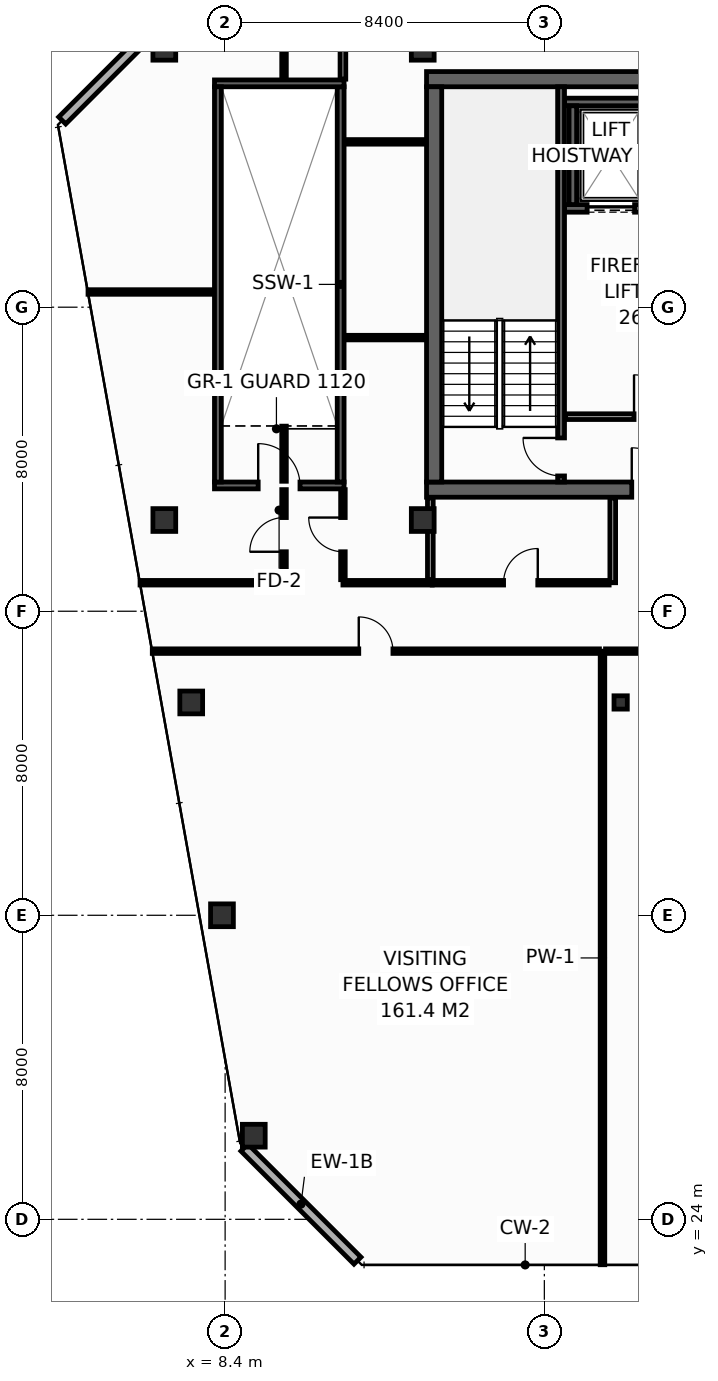
"""IFC4 building model, lengths in metres.
Left out: names, types, materials, properties, quantities, classifications, styles, units other than length and angle.
Written with IfcOpenShell. Run it as: python <this file> out.ifc"""

import sys

from ifc_helpers import new_model, si_unit, direction, frame, frame_2d, origin, origin_2d, place, context, subcontext, project, spatial, rectangle, hollow_rectangle, extrude, element, fill, save


model = new_model("IFC4")
c1 = context("Model", 3, precision=1e-05, world=origin(), true_north=direction((0.0, 1.0)))
c2 = subcontext(c1, "Body", "Model", "MODEL_VIEW")
j1 = project(units=[si_unit("LENGTHUNIT", "METRE"), si_unit("PLANEANGLEUNIT", "RADIAN")], contexts=[c1])
p1 = place(None, origin())
s1 = spatial("IfcSite", under=j1, at=p1, CompositionType="ELEMENT")
p2 = place(p1, origin())
s2 = spatial("IfcBuilding", under=s1, at=p2, CompositionType="ELEMENT")
p3 = place(p2, frame((0.0, 0.0, 272.4)))
s3 = spatial("IfcBuildingStorey", under=s2, at=p3, CompositionType="ELEMENT", Elevation=272.4)
p4 = place(p3, frame((13.7, 43.2, 0.0), z_axis=(0.0, 0.0, 1.0), x_axis=(1.0, 0.0, 0.0)))
e1 = element("IfcWall", 1, at=p4, inside=s3, PredefinedType="SHEAR", context=c2, shape_type="SweptSolid", body=[
    extrude(rectangle(XDim=32.5, YDim=0.4, at=frame_2d((16.25, 0.0))), origin(), (0.0, 0.0, 1.0), 3.35),
])
p5 = place(p4, frame((5.4, 0.0, 0.0)))
e2 = element("IfcOpeningElement", 2, at=p5, cuts=e1, PredefinedType="OPENING", context=c2, shape_type="SweptSolid", body=[
    extrude(rectangle(XDim=1.1, YDim=2.15, at=frame_2d((0.55, 1.075))), frame((0.0, 0.21, 0.0), z_axis=(0.0, -1.0, 0.0), x_axis=(1.0, 0.0, 0.0)), (0.0, 0.0, 1.0), 0.42),
])
p6 = place(p4, frame((25.6, 0.0, 0.0)))
e3 = element("IfcOpeningElement", 3, at=p6, cuts=e1, PredefinedType="OPENING", context=c2, shape_type="SweptSolid", body=[
    extrude(rectangle(XDim=1.1, YDim=2.15, at=frame_2d((0.55, 1.075))), frame((0.0, 0.21, 0.0), z_axis=(0.0, -1.0, 0.0), x_axis=(1.0, 0.0, 0.0)), (0.0, 0.0, 1.0), 0.42),
])
p7 = place(p3, frame((13.7, 54.0, 0.0), z_axis=(0.0, 0.0, 1.0), x_axis=(1.0, 0.0, 0.0)))
e4 = element("IfcWall", 4, at=p7, inside=s3, PredefinedType="SHEAR", context=c2, shape_type="SweptSolid", body=[
    extrude(rectangle(XDim=32.5, YDim=0.4, at=frame_2d((16.25, 0.0))), origin(), (0.0, 0.0, 1.0), 3.35),
])
p8 = place(p3, frame((13.9, 43.4, 0.0), z_axis=(0.0, 0.0, 1.0), x_axis=(0.0, 1.0, 0.0)))
e5 = element("IfcWall", 5, at=p8, inside=s3, PredefinedType="SHEAR", context=c2, shape_type="SweptSolid", body=[
    extrude(rectangle(XDim=10.4, YDim=0.4, at=frame_2d((5.2, 0.0))), origin(), (0.0, 0.0, 1.0), 3.35),
])
for number, where, z_axis, x_axis in (
    (6, (6.8, 54.8, 0.0), (0.0, 0.0, 1.0), (1.0, 0.0, 0.0)),
    (7, (13.6, 54.8, 0.0), (0.0, 0.0, 1.0), (1.0, 0.0, 0.0)),
    (8, (6.8, 42.4, 0.0), (0.0, 0.0, 1.0), (1.0, 0.0, 0.0)),
    (9, (13.6, 42.4, 0.0), (0.0, 0.0, 1.0), (1.0, 0.0, 0.0)),
    (10, (9.154, 26.2, 0.0), (0.0, 0.0, 1.0), (1.0, 0.0, 0.0)),
    (11, (8.317, 32.0, 0.0), (0.0, 0.0, 1.0), (1.0, 0.0, 0.0)),
    (12, (7.508, 37.6, 0.0), (0.0, 0.0, 1.0), (1.0, 0.0, 0.0)),
):
    element("IfcColumn", number, at=place(p3, frame(where, z_axis=z_axis, x_axis=x_axis)), inside=s3, PredefinedType="COLUMN", context=c2, shape_type="SweptSolid", body=[
        extrude(hollow_rectangle(XDim=0.6, YDim=0.6, WallThickness=0.028, at=origin_2d()), origin(), (0.0, 0.0, 1.0), 3.8),
    ])
p9 = place(p3, frame((18.808, 37.6, 0.0), z_axis=(0.0, 0.0, 1.0), x_axis=(1.0, 0.0, 0.0)))
e13 = element("IfcColumn", 13, at=p9, inside=s3, PredefinedType="COLUMN", context=c2, shape_type="SweptSolid", body=[
    extrude(hollow_rectangle(XDim=0.35, YDim=0.35, WallThickness=0.016, at=origin_2d()), origin(), (0.0, 0.0, 1.0), 3.8),
])
p10 = place(p3, frame((17.33, 50.6, 0.0), z_axis=(0.0, 0.0, 1.0), x_axis=(1.0, 0.0, 0.0)))
e14 = element("IfcWall", 14, at=p10, inside=s3, PredefinedType="SHEAR", context=c2, shape_type="SweptSolid", body=[
    extrude(rectangle(XDim=2.52, YDim=0.2, at=frame_2d((1.26, 0.0))), origin(), (0.0, 0.0, 1.0), 3.35),
])
p11 = place(p10, frame((0.595, 0.0, 0.0)))
e15 = element("IfcOpeningElement", 15, at=p11, cuts=e14, PredefinedType="OPENING", context=c2, shape_type="SweptSolid", body=[
    extrude(rectangle(XDim=1.25, YDim=2.3, at=frame_2d((0.625, 1.15))), frame((0.0, 0.11, 0.0), z_axis=(0.0, -1.0, 0.0), x_axis=(1.0, 0.0, 0.0)), (0.0, 0.0, 1.0), 0.22),
])
p12 = place(p3, frame((17.33, 53.4, 0.0), z_axis=(0.0, 0.0, 1.0), x_axis=(1.0, 0.0, 0.0)))
e16 = element("IfcWall", 16, at=p12, inside=s3, PredefinedType="SHEAR", context=c2, shape_type="SweptSolid", body=[
    extrude(rectangle(XDim=2.52, YDim=0.2, at=frame_2d((1.26, 0.0))), origin(), (0.0, 0.0, 1.0), 3.35),
])
p13 = place(p3, frame((17.55, 50.7, 0.0), z_axis=(0.0, 0.0, 1.0), x_axis=(0.0, 1.0, 0.0)))
e17 = element("IfcWall", 17, at=p13, inside=s3, PredefinedType="SHEAR", context=c2, shape_type="SweptSolid", body=[
    extrude(rectangle(XDim=2.6, YDim=0.2, at=frame_2d((1.3, 0.0))), origin(), (0.0, 0.0, 1.0), 3.35),
])
p14 = place(p3, frame((17.24, 43.4, 0.0), z_axis=(0.0, 0.0, 1.0), x_axis=(0.0, 1.0, 0.0)))
e18 = element("IfcWall", 18, at=p14, inside=s3, PredefinedType="SHEAR", context=c2, shape_type="SweptSolid", body=[
    extrude(rectangle(XDim=10.4, YDim=0.18, at=frame_2d((5.2, 0.0))), origin(), (0.0, 0.0, 1.0), 3.35),
])
p15 = place(p14, frame((0.16, 0.0, 0.0)))
e19 = element("IfcOpeningElement", 19, at=p15, cuts=e18, PredefinedType="OPENING", context=c2, shape_type="SweptSolid", body=[
    extrude(rectangle(XDim=1.0, YDim=2.15, at=frame_2d((0.5, 1.075))), frame((0.0, 0.1, 0.0), z_axis=(0.0, -1.0, 0.0), x_axis=(1.0, 0.0, 0.0)), (0.0, 0.0, 1.0), 0.2),
])
p16 = place(p3, frame((8.12, 43.31, 0.0), z_axis=(0.0, 0.0, 1.0), x_axis=(1.0, 0.0, 0.0)))
e20 = element("IfcWall", 20, at=p16, inside=s3, PredefinedType="SHEAR", context=c2, shape_type="SweptSolid", body=[
    extrude(rectangle(XDim=3.41, YDim=0.18, at=frame_2d((1.705, 0.0))), origin(), (0.0, 0.0, 1.0), 3.35),
])
p17 = place(p16, frame((1.15, 0.0, 0.0)))
e21 = element("IfcOpeningElement", 21, at=p17, cuts=e20, PredefinedType="OPENING", context=c2, shape_type="SweptSolid", body=[
    extrude(rectangle(XDim=1.1, YDim=2.15, at=frame_2d((0.55, 1.075))), frame((0.0, 0.1, 0.0), z_axis=(0.0, -1.0, 0.0), x_axis=(1.0, 0.0, 0.0)), (0.0, 0.0, 1.0), 0.2),
])
p18 = place(p3, frame((11.44, 43.4, 0.0), z_axis=(0.0, 0.0, 1.0), x_axis=(0.0, 1.0, 0.0)))
e22 = element("IfcWall", 22, at=p18, inside=s3, PredefinedType="SHEAR", context=c2, shape_type="SweptSolid", body=[
    extrude(rectangle(XDim=10.4, YDim=0.18, at=frame_2d((5.2, 0.0))), origin(), (0.0, 0.0, 1.0), 3.35),
])
p19 = place(p3, frame((11.53, 53.89, 0.0), z_axis=(0.0, 0.0, 1.0), x_axis=(-1.0, 0.0, 0.0)))
e23 = element("IfcWall", 23, at=p19, inside=s3, PredefinedType="SHEAR", context=c2, shape_type="SweptSolid", body=[
    extrude(rectangle(XDim=3.41, YDim=0.18, at=frame_2d((1.705, 0.0))), origin(), (0.0, 0.0, 1.0), 3.35),
])
p20 = place(p3, frame((8.21, 53.8, 0.0), z_axis=(0.0, 0.0, 1.0), x_axis=(0.0, -1.0, 0.0)))
e24 = element("IfcWall", 24, at=p20, inside=s3, PredefinedType="SHEAR", context=c2, shape_type="SweptSolid", body=[
    extrude(rectangle(XDim=10.4, YDim=0.18, at=frame_2d((5.2, 0.0))), origin(), (0.0, 0.0, 1.0), 3.35),
])
p21 = place(p3, frame((17.36, 45.12, 0.0), z_axis=(0.0, 0.0, 1.0), x_axis=(1.0, 0.0, 0.0)))
e25 = element("IfcWall", 25, at=p21, inside=s3, PredefinedType="PARTITIONING", context=c2, shape_type="SweptSolid", body=[
    extrude(rectangle(XDim=5.14, YDim=0.15, at=frame_2d((2.57, 0.0))), origin(), (0.0, 0.0, 1.0), 3.35),
])
p22 = place(p21, frame((1.8, 0.0, 0.0)))
e26 = element("IfcOpeningElement", 26, at=p22, cuts=e25, PredefinedType="OPENING", context=c2, shape_type="SweptSolid", body=[
    extrude(rectangle(XDim=1.1, YDim=2.15, at=frame_2d((0.55, 1.075))), frame((0.0, 0.085, 0.0), z_axis=(0.0, -1.0, 0.0), x_axis=(1.0, 0.0, 0.0)), (0.0, 0.0, 1.0), 0.17),
])
for number, where, z_axis, x_axis in (
    (27, (8.909, 25.887, 0.0), (0.0, 0.0, 1.0), (0.707, -0.707, 0.0)),
    (28, (7.087, 55.887, 0.0), (0.0, 0.0, 1.0), (-0.707, -0.707, 0.0)),
):
    element("IfcWall", number, at=place(p3, frame(where, z_axis=z_axis, x_axis=x_axis)), inside=s3, PredefinedType="STANDARD", context=c2, shape_type="SweptSolid", body=[
        extrude(rectangle(XDim=4.206, YDim=0.26, at=frame_2d((2.103, 0.0))), origin(), (0.0, 0.0, 1.0), 3.35),
    ])
p23 = place(p3, frame((6.161, 40.75, 0.0), z_axis=(0.0, 0.0, 1.0), x_axis=(1.0, 0.0, 0.0)))
e29 = element("IfcWall", 29, at=p23, inside=s3, PredefinedType="PARTITIONING", context=c2, shape_type="SweptSolid", body=[
    extrude(rectangle(XDim=3.789, YDim=0.12, at=frame_2d((1.894, 0.0))), origin(), (0.0, 0.0, 1.0), 2.885),
])
p24 = place(p3, frame((11.5, 40.75, 0.0), z_axis=(0.0, 0.0, 1.0), x_axis=(1.0, 0.0, 0.0)))
e30 = element("IfcWall", 30, at=p24, inside=s3, PredefinedType="PARTITIONING", context=c2, shape_type="SweptSolid", body=[
    extrude(rectangle(XDim=2.35, YDim=0.12, at=frame_2d((1.175, 0.0))), origin(), (0.0, 0.0, 1.0), 3.35),
])
p25 = place(p3, frame((11.55, 52.35, 0.0), z_axis=(0.0, 0.0, 1.0), x_axis=(1.0, 0.0, 0.0)))
e31 = element("IfcWall", 31, at=p25, inside=s3, PredefinedType="PARTITIONING", context=c2, shape_type="SweptSolid", body=[
    extrude(rectangle(XDim=2.13, YDim=0.12, at=frame_2d((1.065, 0.0))), origin(), (0.0, 0.0, 1.0), 3.35),
])
p26 = place(p3, frame((11.5, 54.0, 0.0), z_axis=(0.0, 0.0, 1.0), x_axis=(0.0, 1.0, 0.0)))
e32 = element("IfcWall", 32, at=p26, inside=s3, PredefinedType="PARTITIONING", context=c2, shape_type="SweptSolid", body=[
    extrude(rectangle(XDim=1.995, YDim=0.15, at=frame_2d((0.998, 0.0))), origin(), (0.0, 0.0, 1.0), 2.735),
])
p27 = place(p3, frame((4.792, 48.4, 0.0), z_axis=(0.0, 0.0, 1.0), x_axis=(1.0, 0.0, 0.0)))
e33 = element("IfcWall", 33, at=p27, inside=s3, PredefinedType="PARTITIONING", context=c2, shape_type="SweptSolid", body=[
    extrude(rectangle(XDim=3.308, YDim=0.12, at=frame_2d((1.654, 0.0))), origin(), (0.0, 0.0, 1.0), 2.747),
])
p28 = place(p3, frame((9.95, 40.83, 0.0), z_axis=(0.0, 0.0, 1.0), x_axis=(0.0, 1.0, 0.0)))
e34 = element("IfcWall", 34, at=p28, inside=s3, PredefinedType="PARTITIONING", context=c2, shape_type="SweptSolid", body=[
    extrude(rectangle(XDim=2.37, YDim=0.12, at=frame_2d((1.185, 0.0))), origin(), (0.0, 0.0, 1.0), 2.747),
])
p29 = place(p28, frame((0.735, 0.0, 0.0)))
e35 = element("IfcOpeningElement", 35, at=p29, cuts=e34, PredefinedType="OPENING", context=c2, shape_type="SweptSolid", body=[
    extrude(rectangle(XDim=0.9, YDim=2.1, at=frame_2d((0.45, 1.05))), frame((0.0, 0.07, 0.0), z_axis=(0.0, -1.0, 0.0), x_axis=(1.0, 0.0, 0.0)), (0.0, 0.0, 1.0), 0.14),
])
p30 = place(p3, frame((9.95, 43.42, 0.0), z_axis=(0.0, 0.0, 1.0), x_axis=(0.0, 1.0, 0.0)))
e36 = element("IfcWall", 36, at=p30, inside=s3, PredefinedType="PARTITIONING", context=c2, shape_type="SweptSolid", body=[
    extrude(rectangle(XDim=1.45, YDim=0.12, at=frame_2d((0.725, 0.0))), origin(), (0.0, 0.0, 1.0), 3.35),
])
p31 = place(p3, frame((9.95, 54.0, 0.0), z_axis=(0.0, 0.0, 1.0), x_axis=(0.0, 1.0, 0.0)))
e37 = element("IfcWall", 37, at=p31, inside=s3, PredefinedType="PARTITIONING", context=c2, shape_type="SweptSolid", body=[
    extrude(rectangle(XDim=1.995, YDim=0.12, at=frame_2d((0.998, 0.0))), origin(), (0.0, 0.0, 1.0), 2.735),
])
p32 = place(p3, frame((11.55, 47.2, 0.0), z_axis=(0.0, 0.0, 1.0), x_axis=(1.0, 0.0, 0.0)))
e38 = element("IfcWall", 38, at=p32, inside=s3, PredefinedType="PARTITIONING", context=c2, shape_type="SweptSolid", body=[
    extrude(rectangle(XDim=2.13, YDim=0.12, at=frame_2d((1.065, 0.0))), origin(), (0.0, 0.0, 1.0), 3.35),
])
p33 = place(p3, frame((11.5, 40.83, 0.0), z_axis=(0.0, 0.0, 1.0), x_axis=(0.0, 1.0, 0.0)))
e39 = element("IfcWall", 39, at=p33, inside=s3, PredefinedType="PARTITIONING", context=c2, shape_type="SweptSolid", body=[
    extrude(rectangle(XDim=2.37, YDim=0.12, at=frame_2d((1.185, 0.0))), origin(), (0.0, 0.0, 1.0), 2.747),
])
p34 = place(p33, frame((0.735, 0.0, 0.0)))
e40 = element("IfcOpeningElement", 40, at=p34, cuts=e39, PredefinedType="OPENING", context=c2, shape_type="SweptSolid", body=[
    extrude(rectangle(XDim=0.9, YDim=2.1, at=frame_2d((0.45, 1.05))), frame((0.0, 0.07, 0.0), z_axis=(0.0, -1.0, 0.0), x_axis=(1.0, 0.0, 0.0)), (0.0, 0.0, 1.0), 0.14),
])
p35 = place(p3, frame((13.8, 40.83, 0.0), z_axis=(0.0, 0.0, 1.0), x_axis=(0.0, 1.0, 0.0)))
e41 = element("IfcWall", 41, at=p35, inside=s3, PredefinedType="PARTITIONING", context=c2, shape_type="SweptSolid", body=[
    extrude(rectangle(XDim=2.15, YDim=0.15, at=frame_2d((1.075, 0.0))), origin(), (0.0, 0.0, 1.0), 3.35),
])
p36 = place(p3, frame((18.6, 40.75, 0.0), z_axis=(0.0, 0.0, 1.0), x_axis=(0.0, 1.0, 0.0)))
e42 = element("IfcWall", 42, at=p36, inside=s3, PredefinedType="PARTITIONING", context=c2, shape_type="SweptSolid", body=[
    extrude(rectangle(XDim=2.23, YDim=0.15, at=frame_2d((1.115, 0.0))), origin(), (0.0, 0.0, 1.0), 3.35),
])
p37 = place(p3, frame((13.85, 40.75, 0.0), z_axis=(0.0, 0.0, 1.0), x_axis=(1.0, 0.0, 0.0)))
e43 = element("IfcWall", 43, at=p37, inside=s3, PredefinedType="PARTITIONING", context=c2, shape_type="SweptSolid", body=[
    extrude(rectangle(XDim=4.655, YDim=0.12, at=frame_2d((2.327, 0.0))), origin(), (0.0, 0.0, 1.0), 3.35),
])
p38 = place(p37, frame((1.877, 0.0, 0.0)))
e44 = element("IfcOpeningElement", 44, at=p38, cuts=e43, PredefinedType="OPENING", context=c2, shape_type="SweptSolid", body=[
    extrude(rectangle(XDim=0.9, YDim=2.1, at=frame_2d((0.45, 1.05))), frame((0.0, 0.07, 0.0), z_axis=(0.0, -1.0, 0.0), x_axis=(1.0, 0.0, 0.0)), (0.0, 0.0, 1.0), 0.14),
])
p39 = place(p3, frame((18.33, 22.805, 0.0), z_axis=(0.0, 0.0, 1.0), x_axis=(0.0, 1.0, 0.0)))
e45 = element("IfcWall", 45, at=p39, inside=s3, PredefinedType="PARTITIONING", context=c2, shape_type="SweptSolid", body=[
    extrude(rectangle(XDim=16.145, YDim=0.12, at=frame_2d((8.073, 0.0))), origin(), (0.0, 0.0, 1.0), 1.535),
])
p40 = place(p3, frame((6.483, 38.95, 0.0), z_axis=(0.0, 0.0, 1.0), x_axis=(1.0, 0.0, 0.0)))
e46 = element("IfcWall", 46, at=p40, inside=s3, PredefinedType="PARTITIONING", context=c2, shape_type="SweptSolid", body=[
    extrude(rectangle(XDim=11.767, YDim=0.12, at=frame_2d((5.883, 0.0))), origin(), (0.0, 0.0, 1.0), 2.885),
])
p41 = place(p40, frame((5.433, 0.0, 0.0)))
e47 = element("IfcOpeningElement", 47, at=p41, cuts=e46, PredefinedType="OPENING", context=c2, shape_type="SweptSolid", body=[
    extrude(rectangle(XDim=0.9, YDim=2.1, at=frame_2d((0.45, 1.05))), frame((0.0, 0.07, 0.0), z_axis=(0.0, -1.0, 0.0), x_axis=(1.0, 0.0, 0.0)), (0.0, 0.0, 1.0), 0.14),
])
p42 = place(p3, frame((18.41, 38.95, 0.0), z_axis=(0.0, 0.0, 1.0), x_axis=(1.0, 0.0, 0.0)))
e48 = element("IfcWall", 48, at=p42, inside=s3, PredefinedType="PARTITIONING", context=c2, shape_type="SweptSolid", body=[
    extrude(rectangle(XDim=1.315, YDim=0.12, at=frame_2d((0.657, 0.0))), origin(), (0.0, 0.0, 1.0), 3.35),
])
p43 = place(p11, origin())
e49 = element("IfcDoor", 49, at=p43, inside=s3, OperationType="SLIDING_TO_LEFT", PredefinedType="DOOR", context=c2, shape_type="SweptSolid", body=[
    extrude(rectangle(XDim=1.25, YDim=2.3, at=frame_2d((0.625, 1.15))), frame((0.0, 0.025, 0.0), z_axis=(0.0, -1.0, 0.0), x_axis=(1.0, 0.0, 0.0)), (0.0, 0.0, 1.0), 0.05),
])
fill(e15, e49)
p44 = place(p15, origin())
e50 = element("IfcDoor", 50, at=p44, inside=s3, OperationType="SINGLE_SWING_RIGHT", PredefinedType="DOOR", context=c2, shape_type="SweptSolid", body=[
    extrude(rectangle(XDim=1.0, YDim=2.15, at=frame_2d((0.5, 1.075))), frame((0.0, 0.025, 0.0), z_axis=(0.0, -1.0, 0.0), x_axis=(1.0, 0.0, 0.0)), (0.0, 0.0, 1.0), 0.05),
])
fill(e19, e50)
p45 = place(p17, origin())
e51 = element("IfcDoor", 51, at=p45, inside=s3, OperationType="SINGLE_SWING_LEFT", PredefinedType="DOOR", context=c2, shape_type="SweptSolid", body=[
    extrude(rectangle(XDim=1.1, YDim=2.15, at=frame_2d((0.55, 1.075))), frame((0.0, 0.025, 0.0), z_axis=(0.0, -1.0, 0.0), x_axis=(1.0, 0.0, 0.0)), (0.0, 0.0, 1.0), 0.05),
])
fill(e21, e51)
p46 = place(p22, origin())
e52 = element("IfcDoor", 52, at=p46, inside=s3, OperationType="SINGLE_SWING_LEFT", PredefinedType="DOOR", context=c2, shape_type="SweptSolid", body=[
    extrude(rectangle(XDim=1.1, YDim=2.15, at=frame_2d((0.55, 1.075))), frame((0.0, 0.025, 0.0), z_axis=(0.0, -1.0, 0.0), x_axis=(1.0, 0.0, 0.0)), (0.0, 0.0, 1.0), 0.05),
])
fill(e26, e52)
p47 = place(p5, origin())
e53 = element("IfcDoor", 53, at=p47, inside=s3, OperationType="SINGLE_SWING_LEFT", PredefinedType="DOOR", context=c2, shape_type="SweptSolid", body=[
    extrude(rectangle(XDim=1.1, YDim=2.15, at=frame_2d((0.55, 1.075))), frame((0.0, 0.025, 0.0), z_axis=(0.0, -1.0, 0.0), x_axis=(1.0, 0.0, 0.0)), (0.0, 0.0, 1.0), 0.05),
])
fill(e2, e53)
p48 = place(p29, origin())
e54 = element("IfcDoor", 54, at=p48, inside=s3, OperationType="SINGLE_SWING_LEFT", PredefinedType="DOOR", context=c2, shape_type="SweptSolid", body=[
    extrude(rectangle(XDim=0.9, YDim=2.1, at=frame_2d((0.45, 1.05))), frame((0.0, 0.025, 0.0), z_axis=(0.0, -1.0, 0.0), x_axis=(1.0, 0.0, 0.0)), (0.0, 0.0, 1.0), 0.05),
])
fill(e35, e54)
p49 = place(p34, origin())
e55 = element("IfcDoor", 55, at=p49, inside=s3, OperationType="SINGLE_SWING_RIGHT", PredefinedType="DOOR", context=c2, shape_type="SweptSolid", body=[
    extrude(rectangle(XDim=0.9, YDim=2.1, at=frame_2d((0.45, 1.05))), frame((0.0, 0.025, 0.0), z_axis=(0.0, -1.0, 0.0), x_axis=(1.0, 0.0, 0.0)), (0.0, 0.0, 1.0), 0.05),
])
fill(e40, e55)
p50 = place(p38, origin())
e56 = element("IfcDoor", 56, at=p50, inside=s3, OperationType="SINGLE_SWING_RIGHT", PredefinedType="DOOR", context=c2, shape_type="SweptSolid", body=[
    extrude(rectangle(XDim=0.9, YDim=2.1, at=frame_2d((0.45, 1.05))), frame((0.0, 0.025, 0.0), z_axis=(0.0, -1.0, 0.0), x_axis=(1.0, 0.0, 0.0)), (0.0, 0.0, 1.0), 0.05),
])
fill(e44, e56)
p51 = place(p41, origin())
e57 = element("IfcDoor", 57, at=p51, inside=s3, OperationType="SINGLE_SWING_LEFT", PredefinedType="DOOR", context=c2, shape_type="SweptSolid", body=[
    extrude(rectangle(XDim=0.9, YDim=2.1, at=frame_2d((0.45, 1.05))), frame((0.0, 0.025, 0.0), z_axis=(0.0, -1.0, 0.0), x_axis=(1.0, 0.0, 0.0)), (0.0, 0.0, 1.0), 0.05),
])
fill(e47, e57)
save(model, sys.argv[1])
